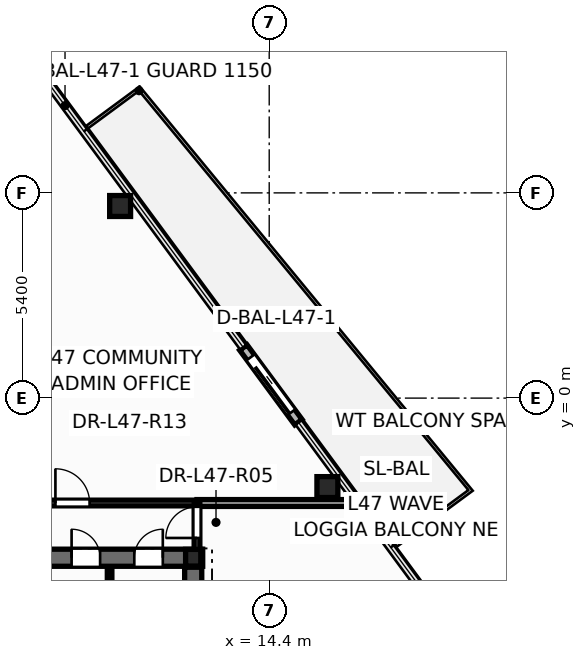
"""IFC4 building model, lengths in metres.
Left out: names, types, materials, properties, quantities, classifications, styles, units other than length and angle.
Written with IfcOpenShell. Run it as: python <this file> out.ifc"""

import sys

from ifc_helpers import new_model, si_unit, direction, frame, frame_2d, origin, origin_2d, place, context, subcontext, project, spatial, rectangle, hollow_circle, i_section, extrude, element, fill, save


model = new_model("IFC4")
c1 = context("Model", 3, precision=1e-05, world=origin(), true_north=direction((0.0, 1.0)))
c2 = subcontext(c1, "Body", "Model", "MODEL_VIEW")
j1 = project(units=[si_unit("LENGTHUNIT", "METRE"), si_unit("PLANEANGLEUNIT", "RADIAN")], contexts=[c1])
p1 = place(None, origin())
s1 = spatial("IfcSite", under=j1, at=p1, CompositionType="ELEMENT")
p2 = place(p1, origin())
s2 = spatial("IfcBuilding", under=s1, at=p2, CompositionType="ELEMENT")
p3 = place(p2, frame((0.0, 0.0, 182.1)))
s3 = spatial("IfcBuildingStorey", under=s2, at=p3, CompositionType="ELEMENT", Elevation=182.1)
for number, where, z_axis, x_axis in (
    (1, (15.931, -2.341, 0.0), (0.0, 0.0, 1.0), (1.0, 0.0, 0.0)),
    (2, (10.477, 5.055, 0.0), (0.0, 0.0, 1.0), (1.0, 0.0, 0.0)),
):
    element("IfcColumn", number, at=place(p3, frame(where, z_axis=z_axis, x_axis=x_axis)), inside=s3, PredefinedType="COLUMN", context=c2, shape_type="SweptSolid", body=[
        extrude(hollow_circle(Radius=0.275, WallThickness=0.024, at=origin_2d()), origin(), (0.0, 0.0, 1.0), 3.6),
    ])
p4 = place(p3, frame((12.4, -4.2, 0.0), z_axis=(0.0, 0.0, 1.0), x_axis=(1.0, 0.0, 0.0)))
e3 = element("IfcColumn", 3, at=p4, inside=s3, PredefinedType="COLUMN", context=c2, shape_type="SweptSolid", body=[
    extrude(i_section(OverallWidth=0.4, OverallDepth=0.44, WebThickness=0.028, FlangeThickness=0.04, at=origin_2d()), origin(), (0.0, 0.0, 1.0), 3.6),
])
p5 = place(p3, frame((15.168, -0.633, -0.015), z_axis=(0.0, 0.0, 1.0), x_axis=(-0.593448168385, 0.804872208142, 0.0)))
e4 = element("IfcWall", 4, at=p5, inside=s3, PredefinedType="STANDARD", context=c2, shape_type="SweptSolid", body=[
    extrude(rectangle(XDim=2.44, YDim=0.24, at=frame_2d((1.22, 0.0))), origin(), (0.0, 0.0, 1.0), 2.807),
])
p6 = place(p5, frame((0.32, 0.0, 0.015)))
e5 = element("IfcOpeningElement", 5, at=p6, cuts=e4, PredefinedType="OPENING", context=c2, shape_type="SweptSolid", body=[
    extrude(rectangle(XDim=1.806, YDim=2.204, at=frame_2d((0.9, 1.102))), frame((0.0, 0.13, 0.0), z_axis=(0.0, -1.0, 0.0), x_axis=(1.0, 0.0, 0.0)), (0.0, 0.0, 1.0), 0.26),
])
p7 = place(p3, frame((10.2, -5.52, 0.0), z_axis=(0.0, 0.0, 1.0), x_axis=(0.0, 1.0, 0.0)))
e6 = element("IfcWall", 6, at=p7, inside=s3, PredefinedType="PARTITIONING", context=c2, shape_type="SweptSolid", body=[
    extrude(rectangle(XDim=1.12, YDim=0.12, at=frame_2d((0.56, 0.0))), origin(), (0.0, 0.0, 1.0), 3.35),
])
p8 = place(p3, frame((-12.65, -4.2, 0.0), z_axis=(0.0, 0.0, 1.0), x_axis=(1.0, 0.0, 0.0)))
e7 = element("IfcWall", 7, at=p8, inside=s3, PredefinedType="SHEAR", context=c2, shape_type="SweptSolid", body=[
    extrude(rectangle(XDim=25.3, YDim=0.45, at=frame_2d((12.65, 0.0))), origin(), (0.0, 0.0, 1.0), 3.6),
])
p9 = place(p8, frame((0.95, 0.0, 0.0)))
e8 = element("IfcOpeningElement", 8, at=p9, cuts=e7, PredefinedType="OPENING", context=c2, shape_type="SweptSolid", body=[
    extrude(rectangle(XDim=0.756, YDim=2.054, at=frame_2d((0.375, 1.027))), frame((0.0, 0.235, 0.0), z_axis=(0.0, -1.0, 0.0), x_axis=(1.0, 0.0, 0.0)), (0.0, 0.0, 1.0), 0.47),
])
p10 = place(p8, frame((2.6, 0.0, 0.0)))
e9 = element("IfcOpeningElement", 9, at=p10, cuts=e7, PredefinedType="OPENING", context=c2, shape_type="SweptSolid", body=[
    extrude(rectangle(XDim=0.756, YDim=2.054, at=frame_2d((0.375, 1.027))), frame((0.0, 0.235, 0.0), z_axis=(0.0, -1.0, 0.0), x_axis=(1.0, 0.0, 0.0)), (0.0, 0.0, 1.0), 0.47),
])
p11 = place(p8, frame((21.85, 0.0, 0.0)))
e10 = element("IfcOpeningElement", 10, at=p11, cuts=e7, PredefinedType="OPENING", context=c2, shape_type="SweptSolid", body=[
    extrude(rectangle(XDim=0.756, YDim=2.054, at=frame_2d((0.375, 1.027))), frame((0.0, 0.235, 0.0), z_axis=(0.0, -1.0, 0.0), x_axis=(1.0, 0.0, 0.0)), (0.0, 0.0, 1.0), 0.47),
])
p12 = place(p8, frame((23.5, 0.0, 0.0)))
e11 = element("IfcOpeningElement", 11, at=p12, cuts=e7, PredefinedType="OPENING", context=c2, shape_type="SweptSolid", body=[
    extrude(rectangle(XDim=0.756, YDim=2.054, at=frame_2d((0.375, 1.027))), frame((0.0, 0.235, 0.0), z_axis=(0.0, -1.0, 0.0), x_axis=(1.0, 0.0, 0.0)), (0.0, 0.0, 1.0), 0.47),
])
p13 = place(p8, frame((5.85, 0.0, 0.0)))
e12 = element("IfcOpeningElement", 12, at=p13, cuts=e7, PredefinedType="OPENING", context=c2, shape_type="SweptSolid", body=[
    extrude(rectangle(XDim=1.006, YDim=2.104, at=frame_2d((0.5, 1.052))), frame((0.0, 0.235, 0.0), z_axis=(0.0, -1.0, 0.0), x_axis=(1.0, 0.0, 0.0)), (0.0, 0.0, 1.0), 0.47),
])
p14 = place(p8, frame((10.35, 0.0, 0.0)))
e13 = element("IfcOpeningElement", 13, at=p14, cuts=e7, PredefinedType="OPENING", context=c2, shape_type="SweptSolid", body=[
    extrude(rectangle(XDim=1.406, YDim=2.154, at=frame_2d((0.7, 1.077))), frame((0.0, 0.235, 0.0), z_axis=(0.0, -1.0, 0.0), x_axis=(1.0, 0.0, 0.0)), (0.0, 0.0, 1.0), 0.47),
])
p15 = place(p8, frame((18.45, 0.0, 0.0)))
e14 = element("IfcOpeningElement", 14, at=p15, cuts=e7, PredefinedType="OPENING", context=c2, shape_type="SweptSolid", body=[
    extrude(rectangle(XDim=1.006, YDim=2.104, at=frame_2d((0.5, 1.052))), frame((0.0, 0.235, 0.0), z_axis=(0.0, -1.0, 0.0), x_axis=(1.0, 0.0, 0.0)), (0.0, 0.0, 1.0), 0.47),
])
p16 = place(p3, frame((12.4, -13.85, 0.0), z_axis=(0.0, 0.0, 1.0), x_axis=(0.0, 1.0, 0.0)))
e15 = element("IfcWall", 15, at=p16, inside=s3, PredefinedType="SHEAR", context=c2, shape_type="SweptSolid", body=[
    extrude(rectangle(XDim=9.4, YDim=0.45, at=frame_2d((4.7, 0.0))), origin(), (0.0, 0.0, 1.0), 3.6),
])
p17 = place(p3, frame((7.662, -2.76, 0.0), z_axis=(0.0, 0.0, 1.0), x_axis=(1.0, 0.0, 0.0)))
e16 = element("IfcWall", 16, at=p17, inside=s3, PredefinedType="PARTITIONING", context=c2, shape_type="SweptSolid", body=[
    extrude(rectangle(XDim=4.838, YDim=0.15, at=frame_2d((2.419, 0.0))), origin(), (0.0, 0.0, 1.0), 3.35),
])
p18 = place(p17, frame((1.112, 0.0, 0.0)))
e17 = element("IfcOpeningElement", 17, at=p18, cuts=e16, PredefinedType="OPENING", context=c2, shape_type="SweptSolid", body=[
    extrude(rectangle(XDim=0.906, YDim=2.104, at=frame_2d((0.45, 1.052))), frame((0.0, 0.085, 0.0), z_axis=(0.0, -1.0, 0.0), x_axis=(1.0, 0.0, 0.0)), (0.0, 0.0, 1.0), 0.17),
])
p19 = place(p3, frame((12.5, -2.76, 0.0), z_axis=(0.0, 0.0, 1.0), x_axis=(1.0, 0.0, 0.0)))
e18 = element("IfcWall", 18, at=p19, inside=s3, PredefinedType="PARTITIONING", context=c2, shape_type="SweptSolid", body=[
    extrude(rectangle(XDim=4.237, YDim=0.18, at=frame_2d((2.118, 0.0))), origin(), (0.0, 0.0, 1.0), 2.325),
])
p20 = place(p3, frame((12.5, -4.24, 0.0), z_axis=(0.0, 0.0, 1.0), x_axis=(0.0, 1.0, 0.0)))
e19 = element("IfcWall", 19, at=p20, inside=s3, PredefinedType="PARTITIONING", context=c2, shape_type="SweptSolid", body=[
    extrude(rectangle(XDim=1.48, YDim=0.15, at=frame_2d((0.74, 0.0))), origin(), (0.0, 0.0, 1.0), 2.325),
])
p21 = place(p20, frame((0.56, 0.0, 0.0)))
e20 = element("IfcOpeningElement", 20, at=p21, cuts=e19, PredefinedType="OPENING", context=c2, shape_type="SweptSolid", body=[
    extrude(rectangle(XDim=0.826, YDim=2.104, at=frame_2d((0.41, 1.052))), frame((0.0, 0.085, 0.0), z_axis=(0.0, -1.0, 0.0), x_axis=(1.0, 0.0, 0.0)), (0.0, 0.0, 1.0), 0.17),
])
p22 = place(p6, origin())
e21 = element("IfcDoor", 21, at=p22, inside=s3, OperationType="SLIDING_TO_LEFT", PredefinedType="DOOR", context=c2, shape_type="SweptSolid", body=[
    extrude(rectangle(XDim=1.8, YDim=2.2, at=frame_2d((0.9, 1.1))), frame((0.0, 0.025, 0.0), z_axis=(0.0, -1.0, 0.0), x_axis=(1.0, 0.0, 0.0)), (0.0, 0.0, 1.0), 0.05),
])
fill(e5, e21)
p23 = place(p11, origin())
e22 = element("IfcDoor", 22, at=p23, inside=s3, OperationType="SINGLE_SWING_LEFT", PredefinedType="DOOR", context=c2, shape_type="SweptSolid", body=[
    extrude(rectangle(XDim=0.75, YDim=2.05, at=frame_2d((0.375, 1.025))), frame((0.0, 0.025, 0.0), z_axis=(0.0, -1.0, 0.0), x_axis=(1.0, 0.0, 0.0)), (0.0, 0.0, 1.0), 0.05),
])
fill(e10, e22)
p24 = place(p12, origin())
e23 = element("IfcDoor", 23, at=p24, inside=s3, OperationType="SINGLE_SWING_RIGHT", PredefinedType="DOOR", context=c2, shape_type="SweptSolid", body=[
    extrude(rectangle(XDim=0.75, YDim=2.05, at=frame_2d((0.375, 1.025))), frame((0.0, 0.025, 0.0), z_axis=(0.0, -1.0, 0.0), x_axis=(1.0, 0.0, 0.0)), (0.0, 0.0, 1.0), 0.05),
])
fill(e11, e23)
p25 = place(p21, origin())
e24 = element("IfcDoor", 24, at=p25, inside=s3, OperationType="SINGLE_SWING_LEFT", PredefinedType="DOOR", context=c2, shape_type="SweptSolid", body=[
    extrude(rectangle(XDim=0.82, YDim=2.1, at=frame_2d((0.41, 1.05))), frame((0.0, 0.025, 0.0), z_axis=(0.0, -1.0, 0.0), x_axis=(1.0, 0.0, 0.0)), (0.0, 0.0, 1.0), 0.05),
])
fill(e20, e24)
p26 = place(p18, origin())
e25 = element("IfcDoor", 25, at=p26, inside=s3, OperationType="SINGLE_SWING_LEFT", PredefinedType="DOOR", context=c2, shape_type="SweptSolid", body=[
    extrude(rectangle(XDim=0.9, YDim=2.1, at=frame_2d((0.45, 1.05))), frame((0.0, 0.025, 0.0), z_axis=(0.0, -1.0, 0.0), x_axis=(1.0, 0.0, 0.0)), (0.0, 0.0, 1.0), 0.05),
])
fill(e17, e25)
save(model, sys.argv[1])
